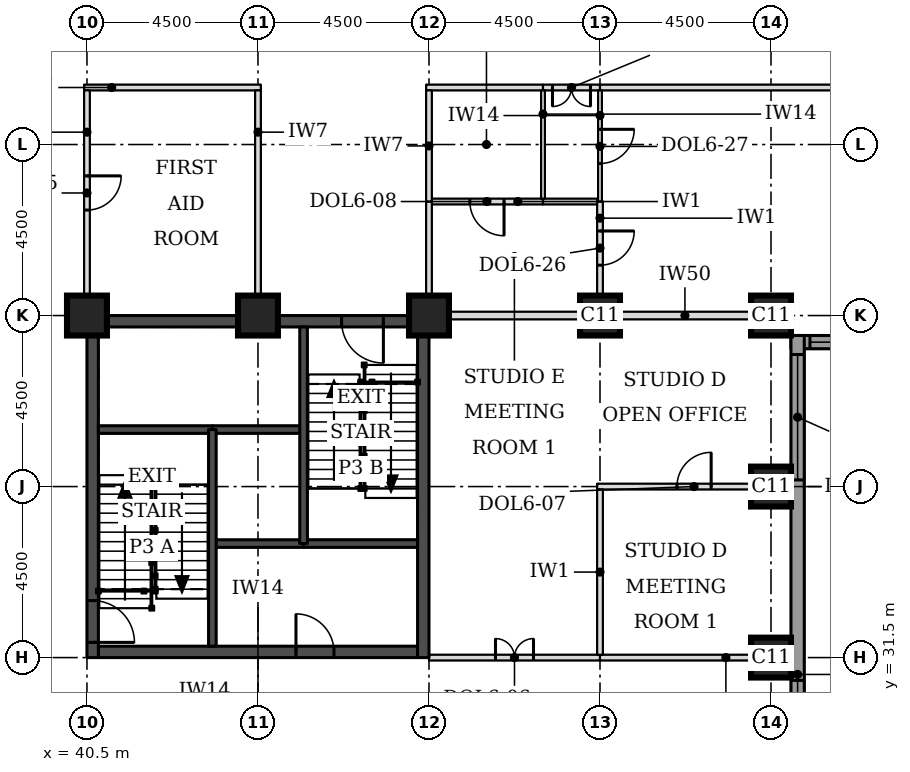
"""IFC4 building model, lengths in metres.
Left out: names, types, materials, properties, quantities, classifications, styles, units other than length and angle.
Written with IfcOpenShell. Run it as: python <this file> out.ifc"""

import sys

from ifc_helpers import new_model, si_unit, direction, frame, frame_2d, origin, origin_2d, place, context, subcontext, project, spatial, rectangle, extrude, element, fill, save


model = new_model("IFC4")
c1 = context("Model", 3, precision=1e-05, world=origin(), true_north=direction((0.0, 1.0)))
c2 = subcontext(c1, "Body", "Model", "MODEL_VIEW")
j1 = project(units=[si_unit("LENGTHUNIT", "METRE"), si_unit("PLANEANGLEUNIT", "RADIAN")], contexts=[c1])
p1 = place(None, origin())
s1 = spatial("IfcSite", under=j1, at=p1, CompositionType="ELEMENT")
p2 = place(p1, origin())
s2 = spatial("IfcBuilding", under=s1, at=p2, CompositionType="ELEMENT")
p3 = place(p2, frame((0.0, 0.0, 119.6)))
s3 = spatial("IfcBuildingStorey", under=s2, at=p3, CompositionType="ELEMENT", Elevation=119.6)
for number, where, z_axis, x_axis in (
    (1, (58.5, 31.5, 0.0), (0.0, 0.0, 1.0), (1.0, 0.0, 0.0)),
    (2, (58.5, 36.0, 0.0), (0.0, 0.0, 1.0), (1.0, 0.0, 0.0)),
    (3, (40.5, 40.5, 0.0), (0.0, 0.0, 1.0), (1.0, 0.0, 0.0)),
    (4, (45.0, 40.5, 0.0), (0.0, 0.0, 1.0), (1.0, 0.0, 0.0)),
    (5, (49.5, 40.5, 0.0), (0.0, 0.0, 1.0), (1.0, 0.0, 0.0)),
    (6, (54.0, 40.5, 0.0), (0.0, 0.0, 1.0), (1.0, 0.0, 0.0)),
    (7, (58.5, 40.5, 0.0), (0.0, 0.0, 1.0), (1.0, 0.0, 0.0)),
):
    element("IfcColumn", number, at=place(p3, frame(where, z_axis=z_axis, x_axis=x_axis)), inside=s3, PredefinedType="COLUMN", context=c2, shape_type="SweptSolid", body=[
        extrude(rectangle(XDim=1.05, YDim=1.05, at=origin_2d()), origin(), (0.0, 0.0, 1.0), 3.7),
    ])
p4 = place(p3, frame((40.8, 31.65, 0.0), z_axis=(0.0, 0.0, 1.0), x_axis=(1.0, 0.0, 0.0)))
e8 = element("IfcWall", 8, at=p4, inside=s3, PredefinedType="SHEAR", context=c2, shape_type="SweptSolid", body=[
    extrude(rectangle(XDim=8.4, YDim=0.3, at=frame_2d((4.2, 0.0))), origin(), (0.0, 0.0, 1.0), 3.7),
])
p5 = place(p4, frame((5.2, 0.0, 0.0)))
e9 = element("IfcOpeningElement", 9, at=p5, cuts=e8, PredefinedType="OPENING", context=c2, shape_type="SweptSolid", body=[
    extrude(rectangle(XDim=1.0, YDim=2.1, at=frame_2d((0.5, 1.05))), frame((0.0, 0.16, 0.0), z_axis=(0.0, -1.0, 0.0), x_axis=(1.0, 0.0, 0.0)), (0.0, 0.0, 1.0), 0.32),
])
p6 = place(p3, frame((40.8, 40.35, 0.0), z_axis=(0.0, 0.0, 1.0), x_axis=(1.0, 0.0, 0.0)))
e10 = element("IfcWall", 10, at=p6, inside=s3, PredefinedType="SHEAR", context=c2, shape_type="SweptSolid", body=[
    extrude(rectangle(XDim=8.4, YDim=0.3, at=frame_2d((4.2, 0.0))), origin(), (0.0, 0.0, 1.0), 3.7),
])
p7 = place(p6, frame((6.4, 0.0, 0.0)))
e11 = element("IfcOpeningElement", 11, at=p7, cuts=e10, PredefinedType="OPENING", context=c2, shape_type="SweptSolid", body=[
    extrude(rectangle(XDim=1.1, YDim=2.1, at=frame_2d((0.55, 1.05))), frame((0.0, 0.16, 0.0), z_axis=(0.0, -1.0, 0.0), x_axis=(1.0, 0.0, 0.0)), (0.0, 0.0, 1.0), 0.32),
])
p8 = place(p3, frame((40.65, 31.5, 0.0), z_axis=(0.0, 0.0, 1.0), x_axis=(0.0, 1.0, 0.0)))
e12 = element("IfcWall", 12, at=p8, inside=s3, PredefinedType="SHEAR", context=c2, shape_type="SweptSolid", body=[
    extrude(rectangle(XDim=9.0, YDim=0.3, at=frame_2d((4.5, 0.0))), origin(), (0.0, 0.0, 1.0), 3.7),
])
p9 = place(p8, frame((0.4, 0.0, 0.0)))
e13 = element("IfcOpeningElement", 13, at=p9, cuts=e12, PredefinedType="OPENING", context=c2, shape_type="SweptSolid", body=[
    extrude(rectangle(XDim=1.1, YDim=2.1, at=frame_2d((0.55, 1.05))), frame((0.0, 0.16, 0.0), z_axis=(0.0, -1.0, 0.0), x_axis=(1.0, 0.0, 0.0)), (0.0, 0.0, 1.0), 0.32),
])
p10 = place(p3, frame((49.35, 31.5, 0.0), z_axis=(0.0, 0.0, 1.0), x_axis=(0.0, 1.0, 0.0)))
e14 = element("IfcWall", 14, at=p10, inside=s3, PredefinedType="SHEAR", context=c2, shape_type="SweptSolid", body=[
    extrude(rectangle(XDim=9.0, YDim=0.3, at=frame_2d((4.5, 0.0))), origin(), (0.0, 0.0, 1.0), 3.7),
])
p11 = place(p3, frame((59.025, 39.8, 0.0), z_axis=(0.0, 0.0, 1.0), x_axis=(1.0, 0.0, 0.0)))
e15 = element("IfcWall", 15, at=p11, inside=s3, PredefinedType="STANDARD", context=c2, shape_type="SweptSolid", body=[
    extrude(rectangle(XDim=13.337, YDim=0.35, at=frame_2d((6.669, 0.0))), origin(), (0.0, 0.0, 1.0), 3.525),
])
p12 = place(p11, frame((0.5, 0.0, 0.9)))
e16 = element("IfcOpeningElement", 16, at=p12, cuts=e15, PredefinedType="OPENING", context=c2, shape_type="SweptSolid", body=[
    extrude(rectangle(XDim=3.3, YDim=1.9, at=frame_2d((1.65, 0.95))), frame((0.0, 0.185, 0.0), z_axis=(0.0, -1.0, 0.0), x_axis=(1.0, 0.0, 0.0)), (0.0, 0.0, 1.0), 0.37),
])
p13 = place(p3, frame((59.2, 22.138, 0.0), z_axis=(0.0, 0.0, 1.0), x_axis=(0.0, 1.0, 0.0)))
e17 = element("IfcWall", 17, at=p13, inside=s3, PredefinedType="STANDARD", context=c2, shape_type="SweptSolid", body=[
    extrude(rectangle(XDim=17.837, YDim=0.35, at=frame_2d((8.919, 0.0))), origin(), (0.0, 0.0, 1.0), 3.525),
])
p14 = place(p13, frame((5.462, 0.0, 0.9)))
e18 = element("IfcOpeningElement", 18, at=p14, cuts=e17, PredefinedType="OPENING", context=c2, shape_type="SweptSolid", body=[
    extrude(rectangle(XDim=3.3, YDim=1.9, at=frame_2d((1.65, 0.95))), frame((0.0, 0.185, 0.0), z_axis=(0.0, -1.0, 0.0), x_axis=(1.0, 0.0, 0.0)), (0.0, 0.0, 1.0), 0.37),
])
p15 = place(p13, frame((14.037, 0.0, 0.9)))
e19 = element("IfcOpeningElement", 19, at=p15, cuts=e17, PredefinedType="OPENING", context=c2, shape_type="SweptSolid", body=[
    extrude(rectangle(XDim=3.3, YDim=1.9, at=frame_2d((1.65, 0.95))), frame((0.0, 0.185, 0.0), z_axis=(0.0, -1.0, 0.0), x_axis=(1.0, 0.0, 0.0)), (0.0, 0.0, 1.0), 0.37),
])
p16 = place(p3, frame((49.5, 31.5, 0.0), z_axis=(0.0, 0.0, 1.0), x_axis=(1.0, 0.0, 0.0)))
e20 = element("IfcWall", 20, at=p16, inside=s3, PredefinedType="PARTITIONING", context=c2, shape_type="SweptSolid", body=[
    extrude(rectangle(XDim=4.5, YDim=0.15, at=frame_2d((2.25, 0.0))), origin(), (0.0, 0.0, 1.0), 2.55),
])
p17 = place(p16, frame((1.75, 0.0, 0.0)))
e21 = element("IfcOpeningElement", 21, at=p17, cuts=e20, PredefinedType="OPENING", context=c2, shape_type="SweptSolid", body=[
    extrude(rectangle(XDim=1.0, YDim=2.1, at=frame_2d((0.5, 1.05))), frame((0.0, 0.085, 0.0), z_axis=(0.0, -1.0, 0.0), x_axis=(1.0, 0.0, 0.0)), (0.0, 0.0, 1.0), 0.17),
])
p18 = place(p3, frame((54.0, 31.5, 0.0), z_axis=(0.0, 0.0, 1.0), x_axis=(1.0, 0.0, 0.0)))
e22 = element("IfcWall", 22, at=p18, inside=s3, PredefinedType="PARTITIONING", context=c2, shape_type="SweptSolid", body=[
    extrude(rectangle(XDim=5.025, YDim=0.15, at=frame_2d((2.512, 0.0))), origin(), (0.0, 0.0, 1.0), 2.55),
])
p19 = place(p3, frame((53.925, 36.0, 0.0), z_axis=(0.0, 0.0, 1.0), x_axis=(1.0, 0.0, 0.0)))
e23 = element("IfcWall", 23, at=p19, inside=s3, PredefinedType="PARTITIONING", context=c2, shape_type="SweptSolid", body=[
    extrude(rectangle(XDim=5.1, YDim=0.15, at=frame_2d((2.55, 0.0))), origin(), (0.0, 0.0, 1.0), 3.096),
])
p20 = place(p19, frame((2.1, 0.0, 0.0)))
e24 = element("IfcOpeningElement", 24, at=p20, cuts=e23, PredefinedType="OPENING", context=c2, shape_type="SweptSolid", body=[
    extrude(rectangle(XDim=0.9, YDim=2.1, at=frame_2d((0.45, 1.05))), frame((0.0, 0.085, 0.0), z_axis=(0.0, -1.0, 0.0), x_axis=(1.0, 0.0, 0.0)), (0.0, 0.0, 1.0), 0.17),
])
p21 = place(p3, frame((50.015, 40.5, 0.0), z_axis=(0.0, 0.0, 1.0), x_axis=(1.0, 0.0, 0.0)))
e25 = element("IfcWall", 25, at=p21, inside=s3, PredefinedType="PARTITIONING", context=c2, shape_type="SweptSolid", body=[
    extrude(rectangle(XDim=3.46, YDim=0.2, at=frame_2d((1.73, 0.0))), origin(), (0.0, 0.0, 1.0), 2.8),
])
p22 = place(p3, frame((54.495, 40.5, 0.0), z_axis=(0.0, 0.0, 1.0), x_axis=(1.0, 0.0, 0.0)))
e26 = element("IfcWall", 26, at=p22, inside=s3, PredefinedType="PARTITIONING", context=c2, shape_type="SweptSolid", body=[
    extrude(rectangle(XDim=3.48, YDim=0.2, at=frame_2d((1.74, 0.0))), origin(), (0.0, 0.0, 1.0), 2.8),
])
p23 = place(p3, frame((49.575, 43.5, 0.0), z_axis=(0.0, 0.0, 1.0), x_axis=(1.0, 0.0, 0.0)))
e27 = element("IfcWall", 27, at=p23, inside=s3, PredefinedType="PARTITIONING", context=c2, shape_type="SweptSolid", body=[
    extrude(rectangle(XDim=2.925, YDim=0.15, at=frame_2d((1.462, 0.0))), origin(), (0.0, 0.0, 1.0), 3.55),
])
p24 = place(p23, frame((1.0, 0.0, 0.0)))
e28 = element("IfcOpeningElement", 28, at=p24, cuts=e27, PredefinedType="OPENING", context=c2, shape_type="SweptSolid", body=[
    extrude(rectangle(XDim=0.9, YDim=2.1, at=frame_2d((0.45, 1.05))), frame((0.0, 0.085, 0.0), z_axis=(0.0, -1.0, 0.0), x_axis=(1.0, 0.0, 0.0)), (0.0, 0.0, 1.0), 0.17),
])
p25 = place(p3, frame((52.5, 43.5, 0.0), z_axis=(0.0, 0.0, 1.0), x_axis=(1.0, 0.0, 0.0)))
e29 = element("IfcWall", 29, at=p25, inside=s3, PredefinedType="PARTITIONING", context=c2, shape_type="SweptSolid", body=[
    extrude(rectangle(XDim=1.425, YDim=0.15, at=frame_2d((0.712, 0.0))), origin(), (0.0, 0.0, 1.0), 3.55),
])
p26 = place(p3, frame((40.425, 46.5, 0.0), z_axis=(0.0, 0.0, 1.0), x_axis=(1.0, 0.0, 0.0)))
e30 = element("IfcWall", 30, at=p26, inside=s3, PredefinedType="PARTITIONING", context=c2, shape_type="SweptSolid", body=[
    extrude(rectangle(XDim=4.65, YDim=0.15, at=frame_2d((2.325, 0.0))), origin(), (0.0, 0.0, 1.0), 3.55),
])
p27 = place(p3, frame((49.425, 46.5, 0.0), z_axis=(0.0, 0.0, 1.0), x_axis=(1.0, 0.0, 0.0)))
e31 = element("IfcWall", 31, at=p27, inside=s3, PredefinedType="PARTITIONING", context=c2, shape_type="SweptSolid", body=[
    extrude(rectangle(XDim=3.075, YDim=0.15, at=frame_2d((1.538, 0.0))), origin(), (0.0, 0.0, 1.0), 3.55),
])
p28 = place(p3, frame((52.5, 46.5, 0.0), z_axis=(0.0, 0.0, 1.0), x_axis=(1.0, 0.0, 0.0)))
e32 = element("IfcWall", 32, at=p28, inside=s3, PredefinedType="PARTITIONING", context=c2, shape_type="SweptSolid", body=[
    extrude(rectangle(XDim=1.5, YDim=0.15, at=frame_2d((0.75, 0.0))), origin(), (0.0, 0.0, 1.0), 3.55),
])
p29 = place(p28, frame((0.25, 0.0, 0.0)))
e33 = element("IfcOpeningElement", 33, at=p29, cuts=e32, PredefinedType="OPENING", context=c2, shape_type="SweptSolid", body=[
    extrude(rectangle(XDim=1.0, YDim=2.1, at=frame_2d((0.5, 1.05))), frame((0.0, 0.085, 0.0), z_axis=(0.0, -1.0, 0.0), x_axis=(1.0, 0.0, 0.0)), (0.0, 0.0, 1.0), 0.17),
])
p30 = place(p3, frame((54.0, 46.5, 0.0), z_axis=(0.0, 0.0, 1.0), x_axis=(1.0, 0.0, 0.0)))
e34 = element("IfcWall", 34, at=p30, inside=s3, PredefinedType="PARTITIONING", context=c2, shape_type="SweptSolid", body=[
    extrude(rectangle(XDim=16.5, YDim=0.15, at=frame_2d((8.25, 0.0))), origin(), (0.0, 0.0, 1.0), 3.55),
])
p31 = place(p3, frame((54.0, 31.575, 0.0), z_axis=(0.0, 0.0, 1.0), x_axis=(0.0, 1.0, 0.0)))
e35 = element("IfcWall", 35, at=p31, inside=s3, PredefinedType="PARTITIONING", context=c2, shape_type="SweptSolid", body=[
    extrude(rectangle(XDim=4.35, YDim=0.15, at=frame_2d((2.175, 0.0))), origin(), (0.0, 0.0, 1.0), 3.55),
])
p32 = place(p3, frame((40.5, 41.025, 0.0), z_axis=(0.0, 0.0, 1.0), x_axis=(0.0, 1.0, 0.0)))
e36 = element("IfcWall", 36, at=p32, inside=s3, PredefinedType="PARTITIONING", context=c2, shape_type="SweptSolid", body=[
    extrude(rectangle(XDim=5.4, YDim=0.15, at=frame_2d((2.7, 0.0))), origin(), (0.0, 0.0, 1.0), 3.55),
])
p33 = place(p32, frame((2.25, 0.0, 0.0)))
e37 = element("IfcOpeningElement", 37, at=p33, cuts=e36, PredefinedType="OPENING", context=c2, shape_type="SweptSolid", body=[
    extrude(rectangle(XDim=0.9, YDim=2.1, at=frame_2d((0.45, 1.05))), frame((0.0, 0.085, 0.0), z_axis=(0.0, -1.0, 0.0), x_axis=(1.0, 0.0, 0.0)), (0.0, 0.0, 1.0), 0.17),
])
p34 = place(p3, frame((45.0, 41.025, 0.0), z_axis=(0.0, 0.0, 1.0), x_axis=(0.0, 1.0, 0.0)))
e38 = element("IfcWall", 38, at=p34, inside=s3, PredefinedType="PARTITIONING", context=c2, shape_type="SweptSolid", body=[
    extrude(rectangle(XDim=5.4, YDim=0.15, at=frame_2d((2.7, 0.0))), origin(), (0.0, 0.0, 1.0), 3.55),
])
p35 = place(p3, frame((49.5, 41.025, 0.0), z_axis=(0.0, 0.0, 1.0), x_axis=(0.0, 1.0, 0.0)))
e39 = element("IfcWall", 39, at=p35, inside=s3, PredefinedType="PARTITIONING", context=c2, shape_type="SweptSolid", body=[
    extrude(rectangle(XDim=2.475, YDim=0.15, at=frame_2d((1.238, 0.0))), origin(), (0.0, 0.0, 1.0), 3.55),
])
p36 = place(p3, frame((54.0, 41.025, 0.0), z_axis=(0.0, 0.0, 1.0), x_axis=(0.0, 1.0, 0.0)))
e40 = element("IfcWall", 40, at=p36, inside=s3, PredefinedType="PARTITIONING", context=c2, shape_type="SweptSolid", body=[
    extrude(rectangle(XDim=2.475, YDim=0.15, at=frame_2d((1.238, 0.0))), origin(), (0.0, 0.0, 1.0), 3.55),
])
p37 = place(p36, frame((0.8, 0.0, 0.0)))
e41 = element("IfcOpeningElement", 41, at=p37, cuts=e40, PredefinedType="OPENING", context=c2, shape_type="SweptSolid", body=[
    extrude(rectangle(XDim=0.9, YDim=2.1, at=frame_2d((0.45, 1.05))), frame((0.0, 0.085, 0.0), z_axis=(0.0, -1.0, 0.0), x_axis=(1.0, 0.0, 0.0)), (0.0, 0.0, 1.0), 0.17),
])
p38 = place(p3, frame((49.5, 43.5, 0.0), z_axis=(0.0, 0.0, 1.0), x_axis=(0.0, 1.0, 0.0)))
e42 = element("IfcWall", 42, at=p38, inside=s3, PredefinedType="PARTITIONING", context=c2, shape_type="SweptSolid", body=[
    extrude(rectangle(XDim=2.925, YDim=0.15, at=frame_2d((1.462, 0.0))), origin(), (0.0, 0.0, 1.0), 3.55),
])
p39 = place(p3, frame((54.0, 43.5, 0.0), z_axis=(0.0, 0.0, 1.0), x_axis=(0.0, 1.0, 0.0)))
e43 = element("IfcWall", 43, at=p39, inside=s3, PredefinedType="PARTITIONING", context=c2, shape_type="SweptSolid", body=[
    extrude(rectangle(XDim=2.925, YDim=0.1, at=frame_2d((1.462, 0.0))), origin(), (0.0, 0.0, 1.0), 3.55),
])
p40 = place(p39, frame((1.0, 0.0, 0.0)))
e44 = element("IfcOpeningElement", 44, at=p40, cuts=e43, PredefinedType="OPENING", context=c2, shape_type="SweptSolid", body=[
    extrude(rectangle(XDim=0.9, YDim=2.1, at=frame_2d((0.45, 1.05))), frame((0.0, 0.06, 0.0), z_axis=(0.0, -1.0, 0.0), x_axis=(1.0, 0.0, 0.0)), (0.0, 0.0, 1.0), 0.12),
])
p41 = place(p3, frame((52.5, 43.575, 0.0), z_axis=(0.0, 0.0, 1.0), x_axis=(0.0, 1.0, 0.0)))
e45 = element("IfcWall", 45, at=p41, inside=s3, PredefinedType="PARTITIONING", context=c2, shape_type="SweptSolid", body=[
    extrude(rectangle(XDim=2.85, YDim=0.1, at=frame_2d((1.425, 0.0))), origin(), (0.0, 0.0, 1.0), 3.55),
])
p42 = place(p3, frame((43.8, 34.5, 0.0), z_axis=(0.0, 0.0, 1.0), x_axis=(1.0, 0.0, 0.0)))
e46 = element("IfcWall", 46, at=p42, inside=s3, PredefinedType="SOLIDWALL", context=c2, shape_type="SweptSolid", body=[
    extrude(rectangle(XDim=2.4, YDim=0.2, at=frame_2d((1.2, 0.0))), origin(), (0.0, 0.0, 1.0), 3.55),
])
p43 = place(p3, frame((46.2, 34.5, 0.0), z_axis=(0.0, 0.0, 1.0), x_axis=(1.0, 0.0, 0.0)))
e47 = element("IfcWall", 47, at=p43, inside=s3, PredefinedType="SOLIDWALL", context=c2, shape_type="SweptSolid", body=[
    extrude(rectangle(XDim=3.0, YDim=0.2, at=frame_2d((1.5, 0.0))), origin(), (0.0, 0.0, 1.0), 3.55),
])
p44 = place(p3, frame((43.8, 37.5, 0.0), z_axis=(0.0, 0.0, 1.0), x_axis=(1.0, 0.0, 0.0)))
e48 = element("IfcWall", 48, at=p44, inside=s3, PredefinedType="SOLIDWALL", context=c2, shape_type="SweptSolid", body=[
    extrude(rectangle(XDim=2.4, YDim=0.2, at=frame_2d((1.2, 0.0))), origin(), (0.0, 0.0, 1.0), 3.7),
])
p45 = place(p3, frame((40.8, 37.5, 0.0), z_axis=(0.0, 0.0, 1.0), x_axis=(1.0, 0.0, 0.0)))
e49 = element("IfcWall", 49, at=p45, inside=s3, PredefinedType="SOLIDWALL", context=c2, shape_type="SweptSolid", body=[
    extrude(rectangle(XDim=3.0, YDim=0.2, at=frame_2d((1.5, 0.0))), origin(), (0.0, 0.0, 1.0), 3.55),
])
for number, where, z_axis, x_axis in (
    (50, (43.8, 31.8, 0.0), (0.0, 0.0, 1.0), (0.0, 1.0, 0.0)),
    (51, (46.2, 34.5, 0.0), (0.0, 0.0, 1.0), (0.0, 1.0, 0.0)),
):
    element("IfcWall", number, at=place(p3, frame(where, z_axis=z_axis, x_axis=x_axis)), inside=s3, PredefinedType="SOLIDWALL", context=c2, shape_type="SweptSolid", body=[
        extrude(rectangle(XDim=5.7, YDim=0.2, at=frame_2d((2.85, 0.0))), origin(), (0.0, 0.0, 1.0), 3.55),
    ])
p46 = place(p12, origin())
e52 = element("IfcWindow", 52, at=p46, inside=s3, PartitioningType="SINGLE_PANEL", PredefinedType="WINDOW", context=c2, shape_type="SweptSolid", body=[
    extrude(rectangle(XDim=3.3, YDim=1.9, at=frame_2d((1.65, 0.95))), frame((0.0, 0.085, 0.0), z_axis=(0.0, -1.0, 0.0), x_axis=(1.0, 0.0, 0.0)), (0.0, 0.0, 1.0), 0.06),
])
fill(e16, e52)
p47 = place(p14, origin())
e53 = element("IfcWindow", 53, at=p47, inside=s3, PartitioningType="SINGLE_PANEL", PredefinedType="WINDOW", context=c2, shape_type="SweptSolid", body=[
    extrude(rectangle(XDim=3.3, YDim=1.9, at=frame_2d((1.65, 0.95))), frame((0.0, 0.085, 0.0), z_axis=(0.0, -1.0, 0.0), x_axis=(1.0, 0.0, 0.0)), (0.0, 0.0, 1.0), 0.06),
])
fill(e18, e53)
p48 = place(p15, origin())
e54 = element("IfcWindow", 54, at=p48, inside=s3, PartitioningType="SINGLE_PANEL", PredefinedType="WINDOW", context=c2, shape_type="SweptSolid", body=[
    extrude(rectangle(XDim=3.3, YDim=1.9, at=frame_2d((1.65, 0.95))), frame((0.0, 0.085, 0.0), z_axis=(0.0, -1.0, 0.0), x_axis=(1.0, 0.0, 0.0)), (0.0, 0.0, 1.0), 0.06),
])
fill(e19, e54)
p49 = place(p33, frame((0.9, 0.0, 0.0), z_axis=(0.0, 0.0, 1.0), x_axis=(-1.0, 0.0, 0.0)))
e55 = element("IfcDoor", 55, at=p49, inside=s3, OperationType="SINGLE_SWING_LEFT", PredefinedType="DOOR", context=c2, shape_type="SweptSolid", body=[
    extrude(rectangle(XDim=0.9, YDim=2.1, at=frame_2d((0.45, 1.05))), frame((0.0, 0.025, 0.0), z_axis=(0.0, -1.0, 0.0), x_axis=(1.0, 0.0, 0.0)), (0.0, 0.0, 1.0), 0.05),
])
fill(e37, e55)
p50 = place(p17, origin())
e56 = element("IfcDoor", 56, at=p50, inside=s3, OperationType="DOUBLE_DOOR_SINGLE_SWING", PredefinedType="DOOR", context=c2, shape_type="SweptSolid", body=[
    extrude(rectangle(XDim=1.0, YDim=2.1, at=frame_2d((0.5, 1.05))), frame((0.0, 0.025, 0.0), z_axis=(0.0, -1.0, 0.0), x_axis=(1.0, 0.0, 0.0)), (0.0, 0.0, 1.0), 0.05),
])
fill(e21, e56)
p51 = place(p20, origin())
e57 = element("IfcDoor", 57, at=p51, inside=s3, OperationType="SINGLE_SWING_RIGHT", PredefinedType="DOOR", context=c2, shape_type="SweptSolid", body=[
    extrude(rectangle(XDim=0.9, YDim=2.1, at=frame_2d((0.45, 1.05))), frame((0.0, 0.025, 0.0), z_axis=(0.0, -1.0, 0.0), x_axis=(1.0, 0.0, 0.0)), (0.0, 0.0, 1.0), 0.05),
])
fill(e24, e57)
p52 = place(p29, frame((1.0, 0.0, 0.0), z_axis=(0.0, 0.0, 1.0), x_axis=(-1.0, 0.0, 0.0)))
e58 = element("IfcDoor", 58, at=p52, inside=s3, OperationType="DOUBLE_DOOR_SINGLE_SWING", PredefinedType="DOOR", context=c2, shape_type="SweptSolid", body=[
    extrude(rectangle(XDim=1.0, YDim=2.1, at=frame_2d((0.5, 1.05))), frame((0.0, 0.025, 0.0), z_axis=(0.0, -1.0, 0.0), x_axis=(1.0, 0.0, 0.0)), (0.0, 0.0, 1.0), 0.05),
])
fill(e33, e58)
p53 = place(p40, frame((0.9, 0.0, 0.0), z_axis=(0.0, 0.0, 1.0), x_axis=(-1.0, 0.0, 0.0)))
e59 = element("IfcDoor", 59, at=p53, inside=s3, OperationType="SINGLE_SWING_LEFT", PredefinedType="DOOR", context=c2, shape_type="SweptSolid", body=[
    extrude(rectangle(XDim=0.9, YDim=2.1, at=frame_2d((0.45, 1.05))), frame((0.0, 0.025, 0.0), z_axis=(0.0, -1.0, 0.0), x_axis=(1.0, 0.0, 0.0)), (0.0, 0.0, 1.0), 0.05),
])
fill(e44, e59)
p54 = place(p37, frame((0.9, 0.0, 0.0), z_axis=(0.0, 0.0, 1.0), x_axis=(-1.0, 0.0, 0.0)))
e60 = element("IfcDoor", 60, at=p54, inside=s3, OperationType="SINGLE_SWING_LEFT", PredefinedType="DOOR", context=c2, shape_type="SweptSolid", body=[
    extrude(rectangle(XDim=0.9, YDim=2.1, at=frame_2d((0.45, 1.05))), frame((0.0, 0.025, 0.0), z_axis=(0.0, -1.0, 0.0), x_axis=(1.0, 0.0, 0.0)), (0.0, 0.0, 1.0), 0.05),
])
fill(e41, e60)
p55 = place(p24, frame((0.9, 0.0, 0.0), z_axis=(0.0, 0.0, 1.0), x_axis=(-1.0, 0.0, 0.0)))
e61 = element("IfcDoor", 61, at=p55, inside=s3, OperationType="SINGLE_SWING_LEFT", PredefinedType="DOOR", context=c2, shape_type="SweptSolid", body=[
    extrude(rectangle(XDim=0.9, YDim=2.1, at=frame_2d((0.45, 1.05))), frame((0.0, 0.025, 0.0), z_axis=(0.0, -1.0, 0.0), x_axis=(1.0, 0.0, 0.0)), (0.0, 0.0, 1.0), 0.05),
])
fill(e28, e61)
p56 = place(p9, frame((1.1, 0.0, 0.0), z_axis=(0.0, 0.0, 1.0), x_axis=(-1.0, 0.0, 0.0)))
e62 = element("IfcDoor", 62, at=p56, inside=s3, OperationType="SINGLE_SWING_RIGHT", PredefinedType="DOOR", context=c2, shape_type="SweptSolid", body=[
    extrude(rectangle(XDim=1.1, YDim=2.1, at=frame_2d((0.55, 1.05))), frame((0.0, 0.025, 0.0), z_axis=(0.0, -1.0, 0.0), x_axis=(1.0, 0.0, 0.0)), (0.0, 0.0, 1.0), 0.05),
])
fill(e13, e62)
p57 = place(p7, frame((1.1, 0.0, 0.0), z_axis=(0.0, 0.0, 1.0), x_axis=(-1.0, 0.0, 0.0)))
e63 = element("IfcDoor", 63, at=p57, inside=s3, OperationType="SINGLE_SWING_LEFT", PredefinedType="DOOR", context=c2, shape_type="SweptSolid", body=[
    extrude(rectangle(XDim=1.1, YDim=2.1, at=frame_2d((0.55, 1.05))), frame((0.0, 0.025, 0.0), z_axis=(0.0, -1.0, 0.0), x_axis=(1.0, 0.0, 0.0)), (0.0, 0.0, 1.0), 0.05),
])
fill(e11, e63)
p58 = place(p5, origin())
e64 = element("IfcDoor", 64, at=p58, inside=s3, OperationType="SINGLE_SWING_LEFT", PredefinedType="DOOR", context=c2, shape_type="SweptSolid", body=[
    extrude(rectangle(XDim=1.0, YDim=2.1, at=frame_2d((0.5, 1.05))), frame((0.0, 0.025, 0.0), z_axis=(0.0, -1.0, 0.0), x_axis=(1.0, 0.0, 0.0)), (0.0, 0.0, 1.0), 0.05),
])
fill(e9, e64)
save(model, sys.argv[1])
